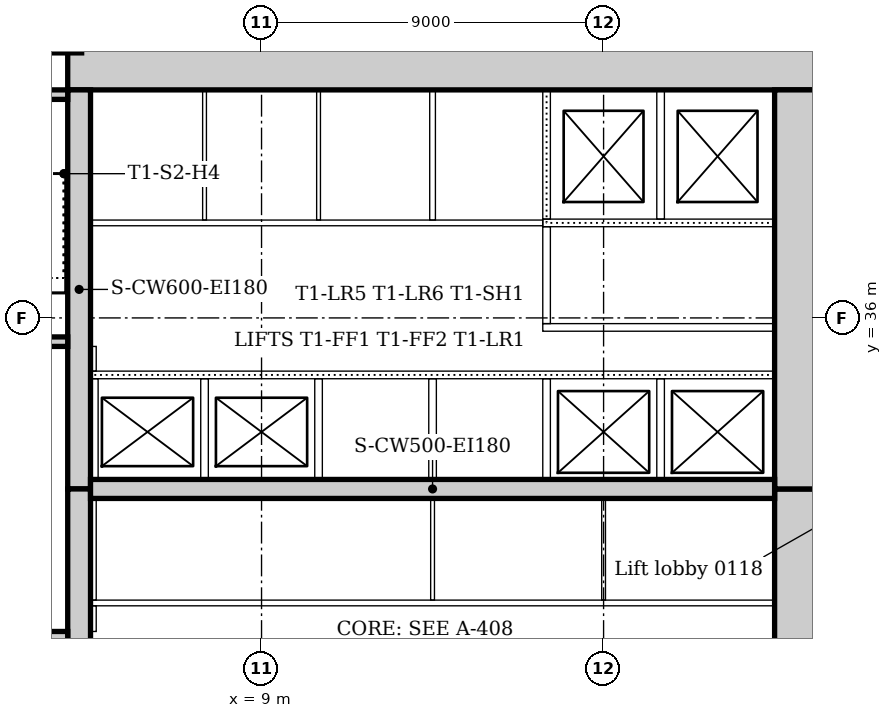
"""IFC4 building model, lengths in metres.
Left out: names, types, materials, properties, quantities, classifications, styles, units other than length and angle.
Written with IfcOpenShell. Run it as: python <this file> out.ifc"""

import sys

from ifc_helpers import new_model, si_unit, direction, frame, frame_2d, origin, origin_2d, place, context, subcontext, project, spatial, rectangle, extrude, element, fill, save


model = new_model("IFC4")
c1 = context("Model", 3, precision=1e-05, world=origin(), true_north=direction((0.0, 1.0)))
c2 = subcontext(c1, "Body", "Model", "MODEL_VIEW")
j1 = project(units=[si_unit("LENGTHUNIT", "METRE"), si_unit("PLANEANGLEUNIT", "RADIAN")], contexts=[c1])
p1 = place(None, origin())
s1 = spatial("IfcSite", under=j1, at=p1, CompositionType="ELEMENT")
p2 = place(p1, origin())
s2 = spatial("IfcBuilding", under=s1, at=p2, CompositionType="ELEMENT")
p3 = place(p2, frame((0.0, 0.0, 6.0)))
s3 = spatial("IfcBuildingStorey", under=s2, at=p3, CompositionType="ELEMENT", Elevation=6.0)
p4 = place(p3, frame((23.7, 42.6, 0.0), z_axis=(0.0, 0.0, 1.0), x_axis=(-1.0, 0.0, 0.0)))
e1 = element("IfcWall", 1, at=p4, inside=s3, PredefinedType="SOLIDWALL", context=c2, shape_type="SweptSolid", body=[
    extrude(rectangle(XDim=19.8, YDim=1.2, at=frame_2d((9.9, 0.0))), origin(), (0.0, 0.0, 1.0), 5.0),
])
p5 = place(p3, frame((23.1, 21.0, 0.0), z_axis=(0.0, 0.0, 1.0), x_axis=(0.0, 1.0, 0.0)))
e2 = element("IfcWall", 2, at=p5, inside=s3, PredefinedType="SOLIDWALL", context=c2, shape_type="SweptSolid", body=[
    extrude(rectangle(XDim=10.5, YDim=1.2, at=frame_2d((5.25, 0.0))), origin(), (0.0, 0.0, 1.0), 5.0),
])
p6 = place(p5, frame((4.35, 0.0, 0.0)))
e3 = element("IfcOpeningElement", 3, at=p6, cuts=e2, PredefinedType="OPENING", context=c2, shape_type="SweptSolid", body=[
    extrude(rectangle(XDim=1.8, YDim=2.1, at=frame_2d((0.9, 1.05))), frame((0.0, 0.61, 0.0), z_axis=(0.0, -1.0, 0.0), x_axis=(1.0, 0.0, 0.0)), (0.0, 0.0, 1.0), 1.22),
])
p7 = place(p3, frame((23.1, 31.5, 0.0), z_axis=(0.0, 0.0, 1.0), x_axis=(0.0, 1.0, 0.0)))
e4 = element("IfcWall", 4, at=p7, inside=s3, PredefinedType="SOLIDWALL", context=c2, shape_type="SweptSolid", body=[
    extrude(rectangle(XDim=10.5, YDim=1.2, at=frame_2d((5.25, 0.0))), origin(), (0.0, 0.0, 1.0), 5.0),
])
p8 = place(p7, frame((3.15, 0.0, 0.0)))
e5 = element("IfcOpeningElement", 5, at=p8, cuts=e4, PredefinedType="OPENING", context=c2, shape_type="SweptSolid", body=[
    extrude(rectangle(XDim=1.0, YDim=2.1, at=frame_2d((0.5, 1.05))), frame((0.0, 0.61, 0.0), z_axis=(0.0, -1.0, 0.0), x_axis=(1.0, 0.0, 0.0)), (0.0, 0.0, 1.0), 1.22),
])
p9 = place(p7, frame((5.2, 0.0, 0.0)))
e6 = element("IfcOpeningElement", 6, at=p9, cuts=e4, PredefinedType="OPENING", context=c2, shape_type="SweptSolid", body=[
    extrude(rectangle(XDim=1.0, YDim=2.1, at=frame_2d((0.5, 1.05))), frame((0.0, 0.61, 0.0), z_axis=(0.0, -1.0, 0.0), x_axis=(1.0, 0.0, 0.0)), (0.0, 0.0, 1.0), 1.22),
])
p10 = place(p3, frame((4.2, 42.0, 0.0), z_axis=(0.0, 0.0, 1.0), x_axis=(0.0, -1.0, 0.0)))
e7 = element("IfcWall", 7, at=p10, inside=s3, PredefinedType="SOLIDWALL", context=c2, shape_type="SweptSolid", body=[
    extrude(rectangle(XDim=10.5, YDim=0.6, at=frame_2d((5.25, 0.0))), origin(), (0.0, 0.0, 1.0), 5.0),
])
p11 = place(p10, frame((5.3, 0.0, 0.0)))
e8 = element("IfcOpeningElement", 8, at=p11, cuts=e7, PredefinedType="OPENING", context=c2, shape_type="SweptSolid", body=[
    extrude(rectangle(XDim=1.0, YDim=2.1, at=frame_2d((0.5, 1.05))), frame((0.0, 0.31, 0.0), z_axis=(0.0, -1.0, 0.0), x_axis=(1.0, 0.0, 0.0)), (0.0, 0.0, 1.0), 0.62),
])
p12 = place(p3, frame((4.2, 31.5, 0.0), z_axis=(0.0, 0.0, 1.0), x_axis=(0.0, -1.0, 0.0)))
e9 = element("IfcWall", 9, at=p12, inside=s3, PredefinedType="SOLIDWALL", context=c2, shape_type="SweptSolid", body=[
    extrude(rectangle(XDim=10.5, YDim=0.6, at=frame_2d((5.25, 0.0))), origin(), (0.0, 0.0, 1.0), 5.0),
])
p13 = place(p12, frame((4.25, 0.0, 0.0)))
e10 = element("IfcOpeningElement", 10, at=p13, cuts=e9, PredefinedType="OPENING", context=c2, shape_type="SweptSolid", body=[
    extrude(rectangle(XDim=1.0, YDim=2.1, at=frame_2d((0.5, 1.05))), frame((0.0, 0.31, 0.0), z_axis=(0.0, -1.0, 0.0), x_axis=(1.0, 0.0, 0.0)), (0.0, 0.0, 1.0), 0.62),
])
p14 = place(p3, frame((4.5, 31.5, 0.0), z_axis=(0.0, 0.0, 1.0), x_axis=(1.0, 0.0, 0.0)))
e11 = element("IfcWall", 11, at=p14, inside=s3, PredefinedType="SOLIDWALL", context=c2, shape_type="SweptSolid", body=[
    extrude(rectangle(XDim=18.0, YDim=0.5, at=frame_2d((9.0, 0.0))), origin(), (0.0, 0.0, 1.0), 5.0),
])
p15 = place(p3, frame((3.9, 27.625, 0.0), z_axis=(0.0, 0.0, 1.0), x_axis=(-1.0, 0.0, 0.0)))
e12 = element("IfcWall", 12, at=p15, inside=s3, PredefinedType="SOLIDWALL", context=c2, shape_type="SweptSolid", body=[
    extrude(rectangle(XDim=3.54, YDim=0.25, at=frame_2d((1.77, 0.0))), origin(), (0.0, 0.0, 1.0), 5.0),
])
p16 = place(p15, frame((0.4, 0.0, 0.0)))
e13 = element("IfcOpeningElement", 13, at=p16, cuts=e12, PredefinedType="OPENING", context=c2, shape_type="SweptSolid", body=[
    extrude(rectangle(XDim=1.0, YDim=2.1, at=frame_2d((0.5, 1.05))), frame((0.0, 0.135, 0.0), z_axis=(0.0, -1.0, 0.0), x_axis=(1.0, 0.0, 0.0)), (0.0, 0.0, 1.0), 0.27),
])
p17 = place(p3, frame((0.36, 35.375, 0.0), z_axis=(0.0, 0.0, 1.0), x_axis=(1.0, 0.0, 0.0)))
e14 = element("IfcWall", 14, at=p17, inside=s3, PredefinedType="SOLIDWALL", context=c2, shape_type="SweptSolid", body=[
    extrude(rectangle(XDim=3.54, YDim=0.25, at=frame_2d((1.77, 0.0))), origin(), (0.0, 0.0, 1.0), 5.0),
])
p18 = place(p17, frame((2.14, 0.0, 0.0)))
e15 = element("IfcOpeningElement", 15, at=p18, cuts=e14, PredefinedType="OPENING", context=c2, shape_type="SweptSolid", body=[
    extrude(rectangle(XDim=1.0, YDim=2.1, at=frame_2d((0.5, 1.05))), frame((0.0, 0.135, 0.0), z_axis=(0.0, -1.0, 0.0), x_axis=(1.0, 0.0, 0.0)), (0.0, 0.0, 1.0), 0.27),
])
p19 = place(p3, frame((3.9, 41.875, 0.0), z_axis=(0.0, 0.0, 1.0), x_axis=(-1.0, 0.0, 0.0)))
e16 = element("IfcWall", 16, at=p19, inside=s3, PredefinedType="SOLIDWALL", context=c2, shape_type="SweptSolid", body=[
    extrude(rectangle(XDim=3.54, YDim=0.25, at=frame_2d((1.77, 0.0))), origin(), (0.0, 0.0, 1.0), 5.0),
])
p20 = place(p3, frame((3.667, 43.574, 0.0), z_axis=(0.0, 0.0, 1.0), x_axis=(1.0, 0.0, 0.0)))
e17 = element("IfcColumn", 17, at=p20, inside=s3, PredefinedType="COLUMN", context=c2, shape_type="SweptSolid", body=[
    extrude(rectangle(XDim=1.2, YDim=1.2, at=origin_2d()), origin(), (0.0, 0.0, 1.0), 4.7),
])
p21 = place(p3, frame((16.4, 35.75, 0.0), z_axis=(0.0, 0.0, 1.0), x_axis=(1.0, 0.0, 0.0)))
e18 = element("IfcWall", 18, at=p21, inside=s3, PredefinedType="PARTITIONING", context=c2, shape_type="SweptSolid", body=[
    extrude(rectangle(XDim=6.1, YDim=0.2, at=frame_2d((3.05, 0.0))), origin(), (0.0, 0.0, 1.0), 4.7),
])
p22 = place(p3, frame((16.4, 38.5, 0.0), z_axis=(0.0, 0.0, 1.0), x_axis=(1.0, 0.0, 0.0)))
e19 = element("IfcWall", 19, at=p22, inside=s3, PredefinedType="PARTITIONING", context=c2, shape_type="SweptSolid", body=[
    extrude(rectangle(XDim=6.1, YDim=0.2, at=frame_2d((3.05, 0.0))), origin(), (0.0, 0.0, 1.0), 4.7),
])
p23 = place(p22, frame((1.0, 0.0, 0.0)))
e20 = element("IfcOpeningElement", 20, at=p23, cuts=e19, PredefinedType="OPENING", context=c2, shape_type="SweptSolid", body=[
    extrude(rectangle(XDim=1.2, YDim=2.1, at=frame_2d((0.6, 1.05))), frame((0.0, 0.11, 0.0), z_axis=(0.0, -1.0, 0.0), x_axis=(1.0, 0.0, 0.0)), (0.0, 0.0, 1.0), 0.22),
])
p24 = place(p22, frame((4.0, 0.0, 0.0)))
e21 = element("IfcOpeningElement", 21, at=p24, cuts=e19, PredefinedType="OPENING", context=c2, shape_type="SweptSolid", body=[
    extrude(rectangle(XDim=1.2, YDim=2.1, at=frame_2d((0.6, 1.05))), frame((0.0, 0.11, 0.0), z_axis=(0.0, -1.0, 0.0), x_axis=(1.0, 0.0, 0.0)), (0.0, 0.0, 1.0), 0.22),
])
p25 = place(p3, frame((16.5, 35.85, 0.0), z_axis=(0.0, 0.0, 1.0), x_axis=(0.0, 1.0, 0.0)))
e22 = element("IfcWall", 22, at=p25, inside=s3, PredefinedType="PARTITIONING", context=c2, shape_type="SweptSolid", body=[
    extrude(rectangle(XDim=2.55, YDim=0.2, at=frame_2d((1.275, 0.0))), origin(), (0.0, 0.0, 1.0), 4.7),
])
p26 = place(p3, frame((4.5, 34.5, 0.0), z_axis=(0.0, 0.0, 1.0), x_axis=(1.0, 0.0, 0.0)))
e23 = element("IfcWall", 23, at=p26, inside=s3, PredefinedType="PARTITIONING", context=c2, shape_type="SweptSolid", body=[
    extrude(rectangle(XDim=18.0, YDim=0.2, at=frame_2d((9.0, 0.0))), origin(), (0.0, 0.0, 1.0), 4.7),
])
p27 = place(p26, frame((0.95, 0.0, 0.0)))
e24 = element("IfcOpeningElement", 24, at=p27, cuts=e23, PredefinedType="OPENING", context=c2, shape_type="SweptSolid", body=[
    extrude(rectangle(XDim=1.1, YDim=2.1, at=frame_2d((0.55, 1.05))), frame((0.0, 0.11, 0.0), z_axis=(0.0, -1.0, 0.0), x_axis=(1.0, 0.0, 0.0)), (0.0, 0.0, 1.0), 0.22),
])
p28 = place(p26, frame((3.95, 0.0, 0.0)))
e25 = element("IfcOpeningElement", 25, at=p28, cuts=e23, PredefinedType="OPENING", context=c2, shape_type="SweptSolid", body=[
    extrude(rectangle(XDim=1.1, YDim=2.1, at=frame_2d((0.55, 1.05))), frame((0.0, 0.11, 0.0), z_axis=(0.0, -1.0, 0.0), x_axis=(1.0, 0.0, 0.0)), (0.0, 0.0, 1.0), 0.22),
])
p29 = place(p26, frame((12.95, 0.0, 0.0)))
e26 = element("IfcOpeningElement", 26, at=p29, cuts=e23, PredefinedType="OPENING", context=c2, shape_type="SweptSolid", body=[
    extrude(rectangle(XDim=1.1, YDim=2.1, at=frame_2d((0.55, 1.05))), frame((0.0, 0.11, 0.0), z_axis=(0.0, -1.0, 0.0), x_axis=(1.0, 0.0, 0.0)), (0.0, 0.0, 1.0), 0.22),
])
p30 = place(p26, frame((15.95, 0.0, 0.0)))
e27 = element("IfcOpeningElement", 27, at=p30, cuts=e23, PredefinedType="OPENING", context=c2, shape_type="SweptSolid", body=[
    extrude(rectangle(XDim=1.1, YDim=2.1, at=frame_2d((0.55, 1.05))), frame((0.0, 0.11, 0.0), z_axis=(0.0, -1.0, 0.0), x_axis=(1.0, 0.0, 0.0)), (0.0, 0.0, 1.0), 0.22),
])
for number, where, z_axis, x_axis in (
    (28, (16.5, 38.6, 0.0), (0.0, 0.0, 1.0), (0.0, 1.0, 0.0)),
    (29, (19.5, 38.6, 0.0), (0.0, 0.0, 1.0), (0.0, 1.0, 0.0)),
):
    element("IfcWall", number, at=place(p3, frame(where, z_axis=z_axis, x_axis=x_axis)), inside=s3, PredefinedType="PARTITIONING", context=c2, shape_type="SweptSolid", body=[
        extrude(rectangle(XDim=3.4, YDim=0.2, at=frame_2d((1.7, 0.0))), origin(), (0.0, 0.0, 1.0), 4.7),
    ])
for number, where, z_axis, x_axis in (
    (30, (4.6, 31.75, 0.0), (0.0, 0.0, 1.0), (0.0, 1.0, 0.0)),
    (31, (7.5, 31.75, 0.0), (0.0, 0.0, 1.0), (0.0, 1.0, 0.0)),
    (32, (10.5, 31.75, 0.0), (0.0, 0.0, 1.0), (0.0, 1.0, 0.0)),
    (33, (13.5, 31.75, 0.0), (0.0, 0.0, 1.0), (0.0, 1.0, 0.0)),
    (34, (16.5, 31.75, 0.0), (0.0, 0.0, 1.0), (0.0, 1.0, 0.0)),
    (35, (19.5, 31.75, 0.0), (0.0, 0.0, 1.0), (0.0, 1.0, 0.0)),
):
    element("IfcWall", number, at=place(p3, frame(where, z_axis=z_axis, x_axis=x_axis)), inside=s3, PredefinedType="PARTITIONING", context=c2, shape_type="SweptSolid", body=[
        extrude(rectangle(XDim=2.65, YDim=0.2, at=frame_2d((1.325, 0.0))), origin(), (0.0, 0.0, 1.0), 4.7),
    ])
p31 = place(p3, frame((4.5, 28.5, 0.0), z_axis=(0.0, 0.0, 1.0), x_axis=(1.0, 0.0, 0.0)))
e36 = element("IfcWall", 36, at=p31, inside=s3, PredefinedType="PARTITIONING", context=c2, shape_type="SweptSolid", body=[
    extrude(rectangle(XDim=18.0, YDim=0.15, at=frame_2d((9.0, 0.0))), origin(), (0.0, 0.0, 1.0), 4.7),
])
p32 = place(p31, frame((4.1, 0.0, 0.0)))
e37 = element("IfcOpeningElement", 37, at=p32, cuts=e36, PredefinedType="OPENING", context=c2, shape_type="SweptSolid", body=[
    extrude(rectangle(XDim=0.9, YDim=2.1, at=frame_2d((0.45, 1.05))), frame((0.0, 0.085, 0.0), z_axis=(0.0, -1.0, 0.0), x_axis=(1.0, 0.0, 0.0)), (0.0, 0.0, 1.0), 0.17),
])
p33 = place(p31, frame((10.8, 0.0, 0.0)))
e38 = element("IfcOpeningElement", 38, at=p33, cuts=e36, PredefinedType="OPENING", context=c2, shape_type="SweptSolid", body=[
    extrude(rectangle(XDim=0.9, YDim=2.1, at=frame_2d((0.45, 1.05))), frame((0.0, 0.085, 0.0), z_axis=(0.0, -1.0, 0.0), x_axis=(1.0, 0.0, 0.0)), (0.0, 0.0, 1.0), 0.17),
])
p34 = place(p31, frame((15.2, 0.0, 0.0)))
e39 = element("IfcOpeningElement", 39, at=p34, cuts=e36, PredefinedType="OPENING", context=c2, shape_type="SweptSolid", body=[
    extrude(rectangle(XDim=0.9, YDim=2.1, at=frame_2d((0.45, 1.05))), frame((0.0, 0.085, 0.0), z_axis=(0.0, -1.0, 0.0), x_axis=(1.0, 0.0, 0.0)), (0.0, 0.0, 1.0), 0.17),
])
p35 = place(p3, frame((4.5, 38.5, 0.0), z_axis=(0.0, 0.0, 1.0), x_axis=(1.0, 0.0, 0.0)))
e40 = element("IfcWall", 40, at=p35, inside=s3, PredefinedType="PARTITIONING", context=c2, shape_type="SweptSolid", body=[
    extrude(rectangle(XDim=11.9, YDim=0.15, at=frame_2d((5.95, 0.0))), origin(), (0.0, 0.0, 1.0), 4.7),
])
p36 = place(p35, frame((1.1, 0.0, 0.0)))
e41 = element("IfcOpeningElement", 41, at=p36, cuts=e40, PredefinedType="OPENING", context=c2, shape_type="SweptSolid", body=[
    extrude(rectangle(XDim=0.9, YDim=2.1, at=frame_2d((0.45, 1.05))), frame((0.0, 0.085, 0.0), z_axis=(0.0, -1.0, 0.0), x_axis=(1.0, 0.0, 0.0)), (0.0, 0.0, 1.0), 0.17),
])
p37 = place(p35, frame((4.05, 0.0, 0.0)))
e42 = element("IfcOpeningElement", 42, at=p37, cuts=e40, PredefinedType="OPENING", context=c2, shape_type="SweptSolid", body=[
    extrude(rectangle(XDim=0.9, YDim=2.1, at=frame_2d((0.45, 1.05))), frame((0.0, 0.085, 0.0), z_axis=(0.0, -1.0, 0.0), x_axis=(1.0, 0.0, 0.0)), (0.0, 0.0, 1.0), 0.17),
])
p38 = place(p35, frame((7.05, 0.0, 0.0)))
e43 = element("IfcOpeningElement", 43, at=p38, cuts=e40, PredefinedType="OPENING", context=c2, shape_type="SweptSolid", body=[
    extrude(rectangle(XDim=0.9, YDim=2.1, at=frame_2d((0.45, 1.05))), frame((0.0, 0.085, 0.0), z_axis=(0.0, -1.0, 0.0), x_axis=(1.0, 0.0, 0.0)), (0.0, 0.0, 1.0), 0.17),
])
p39 = place(p35, frame((9.95, 0.0, 0.0)))
e44 = element("IfcOpeningElement", 44, at=p39, cuts=e40, PredefinedType="OPENING", context=c2, shape_type="SweptSolid", body=[
    extrude(rectangle(XDim=0.8, YDim=2.1, at=frame_2d((0.4, 1.05))), frame((0.0, 0.085, 0.0), z_axis=(0.0, -1.0, 0.0), x_axis=(1.0, 0.0, 0.0)), (0.0, 0.0, 1.0), 0.17),
])
p40 = place(p3, frame((4.575, 27.75, 0.0), z_axis=(0.0, 0.0, 1.0), x_axis=(0.0, 1.0, 0.0)))
e45 = element("IfcWall", 45, at=p40, inside=s3, PredefinedType="PARTITIONING", context=c2, shape_type="SweptSolid", body=[
    extrude(rectangle(XDim=0.675, YDim=0.15, at=frame_2d((0.338, 0.0))), origin(), (0.0, 0.0, 1.0), 4.7),
])
p41 = place(p3, frame((4.575, 28.575, 0.0), z_axis=(0.0, 0.0, 1.0), x_axis=(0.0, 1.0, 0.0)))
e46 = element("IfcWall", 46, at=p41, inside=s3, PredefinedType="PARTITIONING", context=c2, shape_type="SweptSolid", body=[
    extrude(rectangle(XDim=2.675, YDim=0.15, at=frame_2d((1.337, 0.0))), origin(), (0.0, 0.0, 1.0), 4.7),
])
p42 = place(p3, frame((4.575, 34.6, 0.0), z_axis=(0.0, 0.0, 1.0), x_axis=(0.0, 1.0, 0.0)))
e47 = element("IfcWall", 47, at=p42, inside=s3, PredefinedType="PARTITIONING", context=c2, shape_type="SweptSolid", body=[
    extrude(rectangle(XDim=0.65, YDim=0.15, at=frame_2d((0.325, 0.0))), origin(), (0.0, 0.0, 1.0), 4.7),
])
p43 = place(p3, frame((13.5, 38.575, 0.0), z_axis=(0.0, 0.0, 1.0), x_axis=(0.0, 1.0, 0.0)))
e48 = element("IfcWall", 48, at=p43, inside=s3, PredefinedType="PARTITIONING", context=c2, shape_type="SweptSolid", body=[
    extrude(rectangle(XDim=3.425, YDim=0.15, at=frame_2d((1.712, 0.0))), origin(), (0.0, 0.0, 1.0), 4.7),
])
for number, where, z_axis, x_axis in (
    (49, (7.5, 38.575, 0.0), (0.0, 0.0, 1.0), (0.0, 1.0, 0.0)),
    (50, (10.5, 38.575, 0.0), (0.0, 0.0, 1.0), (0.0, 1.0, 0.0)),
):
    element("IfcWall", number, at=place(p3, frame(where, z_axis=z_axis, x_axis=x_axis)), inside=s3, PredefinedType="PARTITIONING", context=c2, shape_type="SweptSolid", body=[
        extrude(rectangle(XDim=3.425, YDim=0.1, at=frame_2d((1.712, 0.0))), origin(), (0.0, 0.0, 1.0), 4.7),
    ])
for number, where, z_axis, x_axis in (
    (51, (13.5, 28.575, 0.0), (0.0, 0.0, 1.0), (0.0, 1.0, 0.0)),
    (52, (18.0, 28.575, 0.0), (0.0, 0.0, 1.0), (0.0, 1.0, 0.0)),
):
    element("IfcWall", number, at=place(p3, frame(where, z_axis=z_axis, x_axis=x_axis)), inside=s3, PredefinedType="PARTITIONING", context=c2, shape_type="SweptSolid", body=[
        extrude(rectangle(XDim=2.675, YDim=0.1, at=frame_2d((1.337, 0.0))), origin(), (0.0, 0.0, 1.0), 4.7),
    ])
p44 = place(p11, frame((1.0, 0.0, 0.0), z_axis=(0.0, 0.0, 1.0), x_axis=(-1.0, 0.0, 0.0)))
e53 = element("IfcDoor", 53, at=p44, inside=s3, OperationType="SINGLE_SWING_LEFT", PredefinedType="DOOR", context=c2, shape_type="SweptSolid", body=[
    extrude(rectangle(XDim=1.0, YDim=2.1, at=frame_2d((0.5, 1.05))), frame((0.0, 0.025, 0.0), z_axis=(0.0, -1.0, 0.0), x_axis=(1.0, 0.0, 0.0)), (0.0, 0.0, 1.0), 0.05),
])
fill(e8, e53)
p45 = place(p27, origin())
e54 = element("IfcDoor", 54, at=p45, inside=s3, OperationType="SLIDING_TO_LEFT", PredefinedType="DOOR", context=c2, shape_type="SweptSolid", body=[
    extrude(rectangle(XDim=1.1, YDim=2.1, at=frame_2d((0.55, 1.05))), frame((0.0, 0.025, 0.0), z_axis=(0.0, -1.0, 0.0), x_axis=(1.0, 0.0, 0.0)), (0.0, 0.0, 1.0), 0.05),
])
fill(e24, e54)
p46 = place(p28, origin())
e55 = element("IfcDoor", 55, at=p46, inside=s3, OperationType="SLIDING_TO_LEFT", PredefinedType="DOOR", context=c2, shape_type="SweptSolid", body=[
    extrude(rectangle(XDim=1.1, YDim=2.1, at=frame_2d((0.55, 1.05))), frame((0.0, 0.025, 0.0), z_axis=(0.0, -1.0, 0.0), x_axis=(1.0, 0.0, 0.0)), (0.0, 0.0, 1.0), 0.05),
])
fill(e25, e55)
p47 = place(p29, origin())
e56 = element("IfcDoor", 56, at=p47, inside=s3, OperationType="SLIDING_TO_LEFT", PredefinedType="DOOR", context=c2, shape_type="SweptSolid", body=[
    extrude(rectangle(XDim=1.1, YDim=2.1, at=frame_2d((0.55, 1.05))), frame((0.0, 0.025, 0.0), z_axis=(0.0, -1.0, 0.0), x_axis=(1.0, 0.0, 0.0)), (0.0, 0.0, 1.0), 0.05),
])
fill(e26, e56)
p48 = place(p30, origin())
e57 = element("IfcDoor", 57, at=p48, inside=s3, OperationType="SLIDING_TO_LEFT", PredefinedType="DOOR", context=c2, shape_type="SweptSolid", body=[
    extrude(rectangle(XDim=1.1, YDim=2.1, at=frame_2d((0.55, 1.05))), frame((0.0, 0.025, 0.0), z_axis=(0.0, -1.0, 0.0), x_axis=(1.0, 0.0, 0.0)), (0.0, 0.0, 1.0), 0.05),
])
fill(e27, e57)
p49 = place(p23, origin())
e58 = element("IfcDoor", 58, at=p49, inside=s3, OperationType="SLIDING_TO_LEFT", PredefinedType="DOOR", context=c2, shape_type="SweptSolid", body=[
    extrude(rectangle(XDim=1.2, YDim=2.1, at=frame_2d((0.6, 1.05))), frame((0.0, 0.025, 0.0), z_axis=(0.0, -1.0, 0.0), x_axis=(1.0, 0.0, 0.0)), (0.0, 0.0, 1.0), 0.05),
])
fill(e20, e58)
p50 = place(p24, origin())
e59 = element("IfcDoor", 59, at=p50, inside=s3, OperationType="SLIDING_TO_LEFT", PredefinedType="DOOR", context=c2, shape_type="SweptSolid", body=[
    extrude(rectangle(XDim=1.2, YDim=2.1, at=frame_2d((0.6, 1.05))), frame((0.0, 0.025, 0.0), z_axis=(0.0, -1.0, 0.0), x_axis=(1.0, 0.0, 0.0)), (0.0, 0.0, 1.0), 0.05),
])
fill(e21, e59)
p51 = place(p8, frame((1.0, 0.0, 0.0), z_axis=(0.0, 0.0, 1.0), x_axis=(-1.0, 0.0, 0.0)))
e60 = element("IfcDoor", 60, at=p51, inside=s3, OperationType="SINGLE_SWING_RIGHT", PredefinedType="DOOR", context=c2, shape_type="SweptSolid", body=[
    extrude(rectangle(XDim=1.0, YDim=2.1, at=frame_2d((0.5, 1.05))), frame((0.0, 0.025, 0.0), z_axis=(0.0, -1.0, 0.0), x_axis=(1.0, 0.0, 0.0)), (0.0, 0.0, 1.0), 0.05),
])
fill(e5, e60)
p52 = place(p9, frame((1.0, 0.0, 0.0), z_axis=(0.0, 0.0, 1.0), x_axis=(-1.0, 0.0, 0.0)))
e61 = element("IfcDoor", 61, at=p52, inside=s3, OperationType="SINGLE_SWING_LEFT", PredefinedType="DOOR", context=c2, shape_type="SweptSolid", body=[
    extrude(rectangle(XDim=1.0, YDim=2.1, at=frame_2d((0.5, 1.05))), frame((0.0, 0.025, 0.0), z_axis=(0.0, -1.0, 0.0), x_axis=(1.0, 0.0, 0.0)), (0.0, 0.0, 1.0), 0.05),
])
fill(e6, e61)
p53 = place(p32, origin())
e62 = element("IfcDoor", 62, at=p53, inside=s3, OperationType="SINGLE_SWING_RIGHT", PredefinedType="DOOR", context=c2, shape_type="SweptSolid", body=[
    extrude(rectangle(XDim=0.9, YDim=2.1, at=frame_2d((0.45, 1.05))), frame((0.0, 0.025, 0.0), z_axis=(0.0, -1.0, 0.0), x_axis=(1.0, 0.0, 0.0)), (0.0, 0.0, 1.0), 0.05),
])
fill(e37, e62)
p54 = place(p33, origin())
e63 = element("IfcDoor", 63, at=p54, inside=s3, OperationType="SINGLE_SWING_RIGHT", PredefinedType="DOOR", context=c2, shape_type="SweptSolid", body=[
    extrude(rectangle(XDim=0.9, YDim=2.1, at=frame_2d((0.45, 1.05))), frame((0.0, 0.025, 0.0), z_axis=(0.0, -1.0, 0.0), x_axis=(1.0, 0.0, 0.0)), (0.0, 0.0, 1.0), 0.05),
])
fill(e38, e63)
p55 = place(p34, origin())
e64 = element("IfcDoor", 64, at=p55, inside=s3, OperationType="SINGLE_SWING_RIGHT", PredefinedType="DOOR", context=c2, shape_type="SweptSolid", body=[
    extrude(rectangle(XDim=0.9, YDim=2.1, at=frame_2d((0.45, 1.05))), frame((0.0, 0.025, 0.0), z_axis=(0.0, -1.0, 0.0), x_axis=(1.0, 0.0, 0.0)), (0.0, 0.0, 1.0), 0.05),
])
fill(e39, e64)
p56 = place(p36, origin())
e65 = element("IfcDoor", 65, at=p56, inside=s3, OperationType="SINGLE_SWING_LEFT", PredefinedType="DOOR", context=c2, shape_type="SweptSolid", body=[
    extrude(rectangle(XDim=0.9, YDim=2.1, at=frame_2d((0.45, 1.05))), frame((0.0, 0.025, 0.0), z_axis=(0.0, -1.0, 0.0), x_axis=(1.0, 0.0, 0.0)), (0.0, 0.0, 1.0), 0.05),
])
fill(e41, e65)
p57 = place(p37, origin())
e66 = element("IfcDoor", 66, at=p57, inside=s3, OperationType="SINGLE_SWING_LEFT", PredefinedType="DOOR", context=c2, shape_type="SweptSolid", body=[
    extrude(rectangle(XDim=0.9, YDim=2.1, at=frame_2d((0.45, 1.05))), frame((0.0, 0.025, 0.0), z_axis=(0.0, -1.0, 0.0), x_axis=(1.0, 0.0, 0.0)), (0.0, 0.0, 1.0), 0.05),
])
fill(e42, e66)
p58 = place(p38, origin())
e67 = element("IfcDoor", 67, at=p58, inside=s3, OperationType="SINGLE_SWING_RIGHT", PredefinedType="DOOR", context=c2, shape_type="SweptSolid", body=[
    extrude(rectangle(XDim=0.9, YDim=2.1, at=frame_2d((0.45, 1.05))), frame((0.0, 0.025, 0.0), z_axis=(0.0, -1.0, 0.0), x_axis=(1.0, 0.0, 0.0)), (0.0, 0.0, 1.0), 0.05),
])
fill(e43, e67)
p59 = place(p39, origin())
e68 = element("IfcDoor", 68, at=p59, inside=s3, OperationType="SINGLE_SWING_RIGHT", PredefinedType="DOOR", context=c2, shape_type="SweptSolid", body=[
    extrude(rectangle(XDim=0.8, YDim=2.1, at=frame_2d((0.4, 1.05))), frame((0.0, 0.025, 0.0), z_axis=(0.0, -1.0, 0.0), x_axis=(1.0, 0.0, 0.0)), (0.0, 0.0, 1.0), 0.05),
])
fill(e44, e68)
save(model, sys.argv[1])
